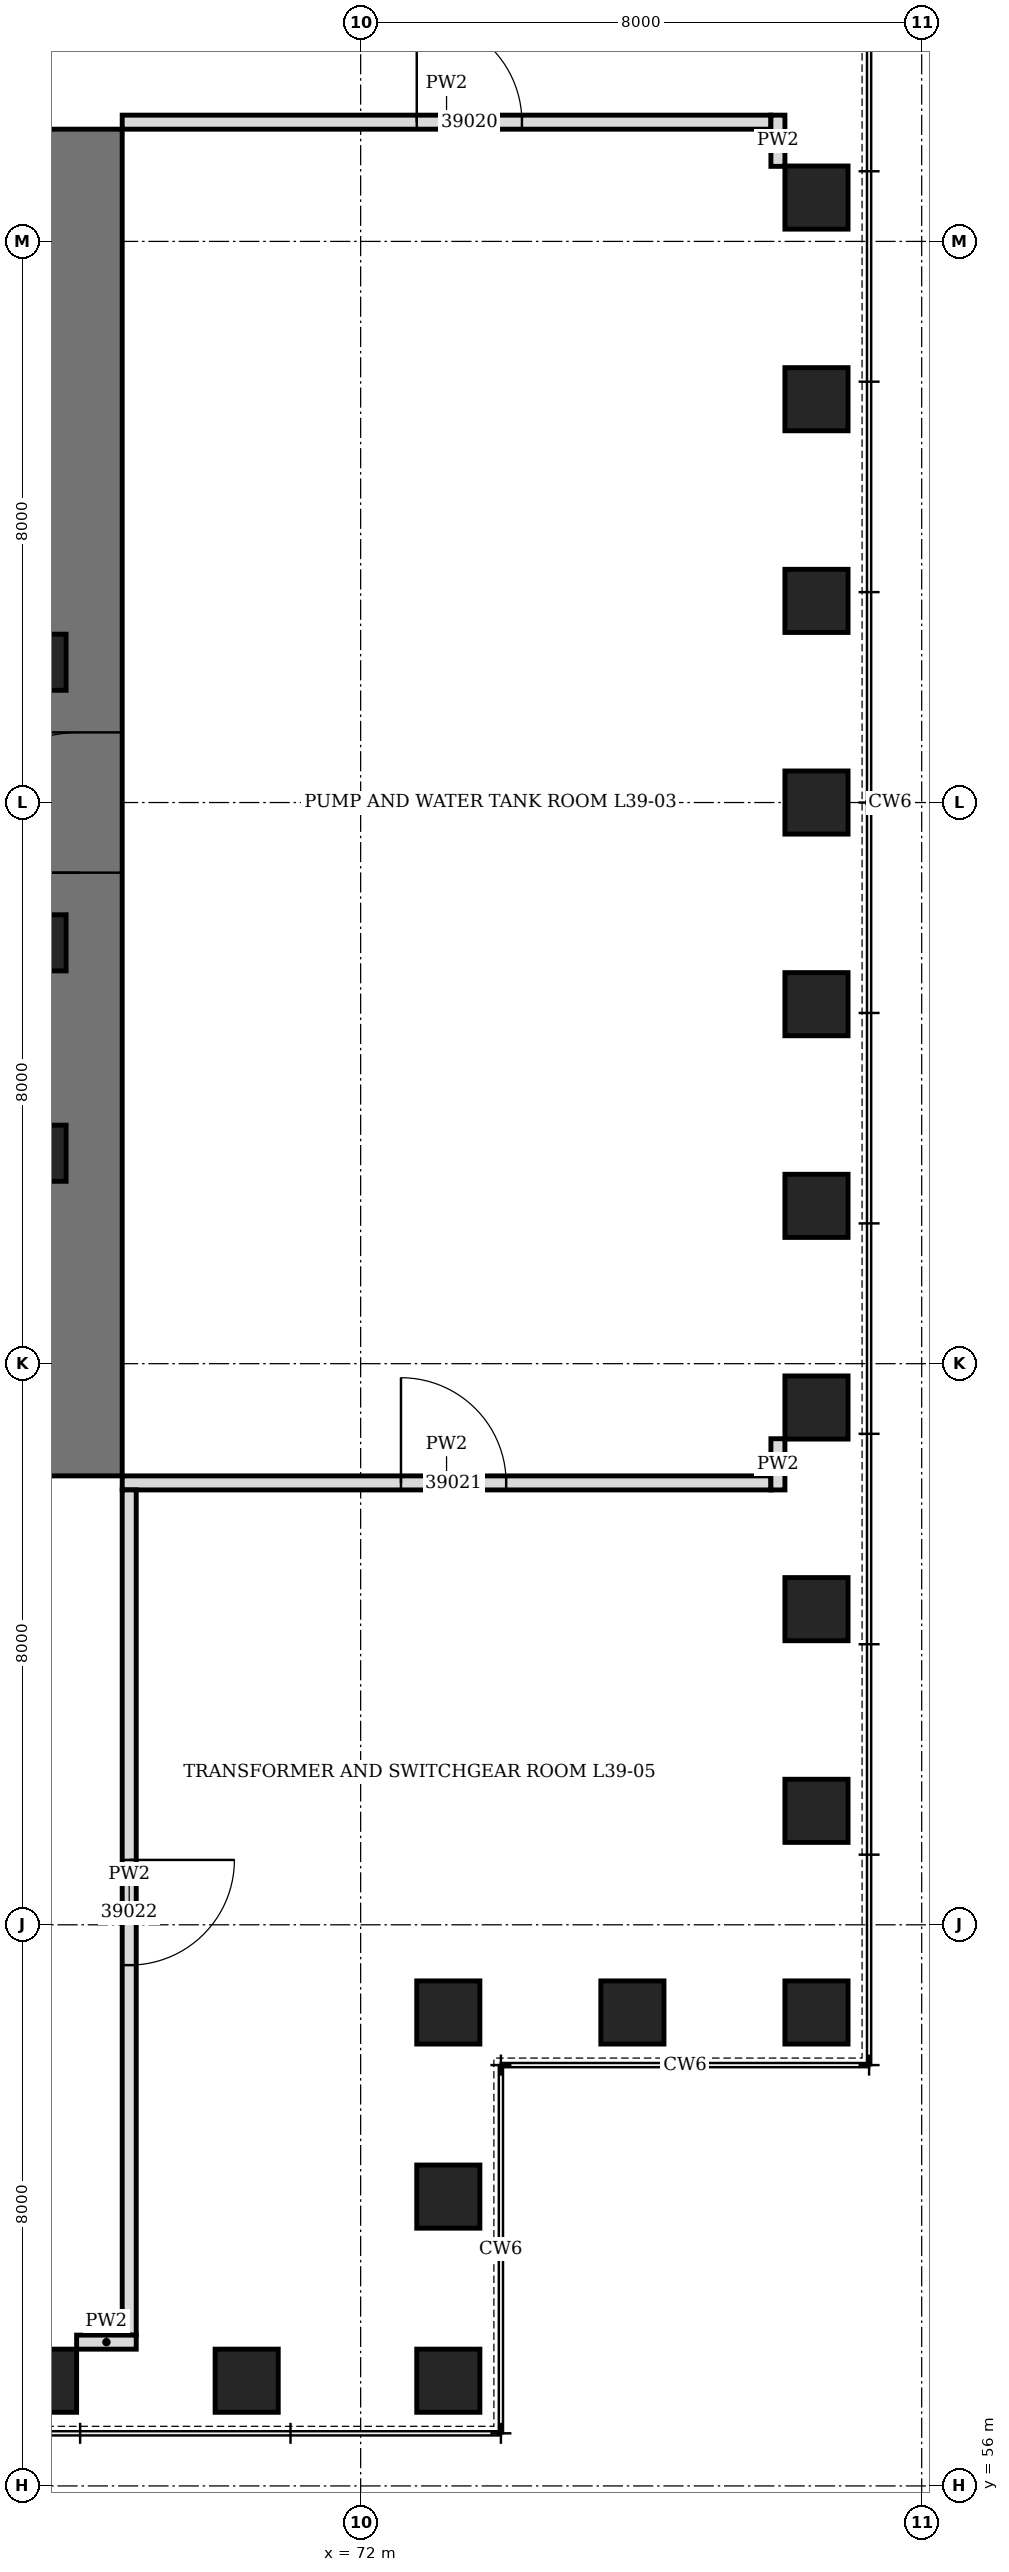
"""IFC4 building model, lengths in metres.
Left out: names, types, materials, properties, quantities, classifications, styles, units other than length and angle.
Written with IfcOpenShell. Run it as: python <this file> out.ifc"""

import sys

from ifc_helpers import new_model, si_unit, direction, frame, frame_2d, origin, origin_2d, place, context, subcontext, project, spatial, rectangle, hollow_rectangle, extrude, element, fill, save


model = new_model("IFC4")
c1 = context("Model", 3, precision=1e-05, world=origin(), true_north=direction((0.0, 1.0)))
c2 = subcontext(c1, "Body", "Model", "MODEL_VIEW")
j1 = project(units=[si_unit("LENGTHUNIT", "METRE"), si_unit("PLANEANGLEUNIT", "RADIAN")], contexts=[c1])
p1 = place(None, origin())
s1 = spatial("IfcSite", under=j1, at=p1, CompositionType="ELEMENT")
p2 = place(p1, origin())
s2 = spatial("IfcBuilding", under=s1, at=p2, CompositionType="ELEMENT")
p3 = place(p2, frame((0.0, 0.0, 175.3)))
s3 = spatial("IfcBuildingStorey", under=s2, at=p3, CompositionType="ELEMENT", Elevation=175.3)
for number, where, z_axis, x_axis in (
    (1, (67.5, 57.5, 0.0), (0.0, 0.0, 1.0), (1.0, 0.0, 0.0)),
    (2, (70.375, 57.5, 0.0), (0.0, 0.0, 1.0), (1.0, 0.0, 0.0)),
    (3, (73.25, 57.5, 0.0), (0.0, 0.0, 1.0), (0.0, 1.0, 0.0)),
    (4, (73.25, 60.125, 0.0), (0.0, 0.0, 1.0), (0.0, 1.0, 0.0)),
    (5, (73.25, 62.75, 0.0), (0.0, 0.0, 1.0), (1.0, 0.0, 0.0)),
    (6, (75.875, 62.75, 0.0), (0.0, 0.0, 1.0), (1.0, 0.0, 0.0)),
    (7, (78.5, 62.75, 0.0), (0.0, 0.0, 1.0), (0.0, 1.0, 0.0)),
    (8, (78.5, 65.625, 0.0), (0.0, 0.0, 1.0), (0.0, 1.0, 0.0)),
    (9, (78.5, 68.5, 0.0), (0.0, 0.0, 1.0), (0.0, 1.0, 0.0)),
    (10, (78.5, 71.375, 0.0), (0.0, 0.0, 1.0), (0.0, 1.0, 0.0)),
    (11, (78.5, 74.25, 0.0), (0.0, 0.0, 1.0), (0.0, 1.0, 0.0)),
    (12, (78.5, 77.125, 0.0), (0.0, 0.0, 1.0), (0.0, 1.0, 0.0)),
    (13, (78.5, 80.0, 0.0), (0.0, 0.0, 1.0), (0.0, 1.0, 0.0)),
    (14, (78.5, 82.875, 0.0), (0.0, 0.0, 1.0), (0.0, 1.0, 0.0)),
    (15, (78.5, 85.75, 0.0), (0.0, 0.0, 1.0), (0.0, 1.0, 0.0)),
    (16, (78.5, 88.625, 0.0), (0.0, 0.0, 1.0), (0.0, 1.0, 0.0)),
):
    element("IfcColumn", number, at=place(p3, frame(where, z_axis=z_axis, x_axis=x_axis)), inside=s3, PredefinedType="COLUMN", context=c2, shape_type="SweptSolid", body=[
        extrude(hollow_rectangle(XDim=0.9, YDim=0.9, WallThickness=0.12, at=origin_2d()), origin(), (0.0, 0.0, 1.0), 5.75),
    ])
p4 = place(p3, frame((68.0, 70.4, 0.0), z_axis=(0.0, 0.0, 1.0), x_axis=(0.0, 1.0, 0.0)))
e17 = element("IfcWall", 17, at=p4, inside=s3, PredefinedType="SHEAR", context=c2, shape_type="SweptSolid", body=[
    extrude(rectangle(XDim=19.2, YDim=1.2, at=frame_2d((9.6, 0.0))), origin(), (0.0, 0.0, 1.0), 6.0),
])
p5 = place(p4, frame((8.6, 0.0, 0.0)))
e18 = element("IfcOpeningElement", 18, at=p5, cuts=e17, PredefinedType="OPENING", context=c2, shape_type="SweptSolid", body=[
    extrude(rectangle(XDim=2.0, YDim=2.4, at=frame_2d((1.0, 1.2))), frame((0.0, 0.61, 0.0), z_axis=(0.0, -1.0, 0.0), x_axis=(1.0, 0.0, 0.0)), (0.0, 0.0, 1.0), 1.22),
])
for number, where, z_axis, x_axis in (
    (19, (67.4, 75.0, 0.0), (0.0, 0.0, 1.0), (1.0, 0.0, 0.0)),
    (20, (67.4, 78.0, 0.0), (0.0, 0.0, 1.0), (1.0, 0.0, 0.0)),
    (21, (67.4, 82.0, 0.0), (0.0, 0.0, 1.0), (1.0, 0.0, 0.0)),
):
    element("IfcColumn", number, at=place(p3, frame(where, z_axis=z_axis, x_axis=x_axis)), inside=s3, PredefinedType="COLUMN", context=c2, shape_type="SweptSolid", body=[
        extrude(hollow_rectangle(XDim=0.8, YDim=0.8, WallThickness=0.1, at=origin_2d()), origin(), (0.0, 0.0, 1.0), 6.0),
    ])
p6 = place(p3, frame((68.6, 89.7, 0.0), z_axis=(0.0, 0.0, 1.0), x_axis=(1.0, 0.0, 0.0)))
e22 = element("IfcWall", 22, at=p6, inside=s3, PredefinedType="PARTITIONING", context=c2, shape_type="SweptSolid", body=[
    extrude(rectangle(XDim=9.25, YDim=0.2, at=frame_2d((4.625, 0.0))), origin(), (0.0, 0.0, 1.0), 5.75),
])
p7 = place(p6, frame((4.2, 0.0, 0.0)))
e23 = element("IfcOpeningElement", 23, at=p7, cuts=e22, PredefinedType="OPENING", context=c2, shape_type="SweptSolid", body=[
    extrude(rectangle(XDim=1.5, YDim=2.4, at=frame_2d((0.75, 1.2))), frame((0.0, 0.11, 0.0), z_axis=(0.0, -1.0, 0.0), x_axis=(1.0, 0.0, 0.0)), (0.0, 0.0, 1.0), 0.22),
])
p8 = place(p3, frame((77.95, 89.8, 0.0), z_axis=(0.0, 0.0, 1.0), x_axis=(0.0, -1.0, 0.0)))
e24 = element("IfcWall", 24, at=p8, inside=s3, PredefinedType="PARTITIONING", context=c2, shape_type="SweptSolid", body=[
    extrude(rectangle(XDim=0.73, YDim=0.2, at=frame_2d((0.365, 0.0))), origin(), (0.0, 0.0, 1.0), 3.25),
])
p9 = place(p3, frame((68.6, 70.3, 0.0), z_axis=(0.0, 0.0, 1.0), x_axis=(1.0, 0.0, 0.0)))
e25 = element("IfcWall", 25, at=p9, inside=s3, PredefinedType="PARTITIONING", context=c2, shape_type="SweptSolid", body=[
    extrude(rectangle(XDim=9.25, YDim=0.2, at=frame_2d((4.625, 0.0))), origin(), (0.0, 0.0, 1.0), 5.75),
])
p10 = place(p9, frame((3.975, 0.0, 0.0)))
e26 = element("IfcOpeningElement", 26, at=p10, cuts=e25, PredefinedType="OPENING", context=c2, shape_type="SweptSolid", body=[
    extrude(rectangle(XDim=1.5, YDim=2.4, at=frame_2d((0.75, 1.2))), frame((0.0, 0.11, 0.0), z_axis=(0.0, -1.0, 0.0), x_axis=(1.0, 0.0, 0.0)), (0.0, 0.0, 1.0), 0.22),
])
p11 = place(p3, frame((77.95, 70.2, 0.0), z_axis=(0.0, 0.0, 1.0), x_axis=(0.0, 1.0, 0.0)))
e27 = element("IfcWall", 27, at=p11, inside=s3, PredefinedType="PARTITIONING", context=c2, shape_type="SweptSolid", body=[
    extrude(rectangle(XDim=0.73, YDim=0.2, at=frame_2d((0.365, 0.0))), origin(), (0.0, 0.0, 1.0), 3.25),
])
p12 = place(p3, frame((68.7, 70.2, 0.0), z_axis=(0.0, 0.0, 1.0), x_axis=(0.0, -1.0, 0.0)))
e28 = element("IfcWall", 28, at=p12, inside=s3, PredefinedType="PARTITIONING", context=c2, shape_type="SweptSolid", body=[
    extrude(rectangle(XDim=12.05, YDim=0.2, at=frame_2d((6.025, 0.0))), origin(), (0.0, 0.0, 1.0), 5.75),
])
p13 = place(p12, frame((5.275, 0.0, 0.0)))
e29 = element("IfcOpeningElement", 29, at=p13, cuts=e28, PredefinedType="OPENING", context=c2, shape_type="SweptSolid", body=[
    extrude(rectangle(XDim=1.5, YDim=2.4, at=frame_2d((0.75, 1.2))), frame((0.0, 0.11, 0.0), z_axis=(0.0, -1.0, 0.0), x_axis=(1.0, 0.0, 0.0)), (0.0, 0.0, 1.0), 0.22),
])
p14 = place(p3, frame((68.8, 58.05, 0.0), z_axis=(0.0, 0.0, 1.0), x_axis=(-1.0, 0.0, 0.0)))
e30 = element("IfcWall", 30, at=p14, inside=s3, PredefinedType="PARTITIONING", context=c2, shape_type="SweptSolid", body=[
    extrude(rectangle(XDim=0.85, YDim=0.2, at=frame_2d((0.425, 0.0))), origin(), (0.0, 0.0, 1.0), 3.25),
])
p15 = place(p5, origin())
e31 = element("IfcDoor", 31, at=p15, inside=s3, OperationType="DOUBLE_DOOR_SINGLE_SWING", PredefinedType="DOOR", context=c2, shape_type="SweptSolid", body=[
    extrude(rectangle(XDim=2.0, YDim=2.4, at=frame_2d((1.0, 1.2))), frame((0.0, 0.35, 0.0), z_axis=(0.0, -1.0, 0.0), x_axis=(1.0, 0.0, 0.0)), (0.0, 0.0, 1.0), 0.7),
])
fill(e18, e31)
p16 = place(p7, origin())
e32 = element("IfcDoor", 32, at=p16, inside=s3, OperationType="DOUBLE_DOOR_SINGLE_SWING", PredefinedType="DOOR", context=c2, shape_type="SweptSolid", body=[
    extrude(rectangle(XDim=1.5, YDim=2.4, at=frame_2d((0.75, 1.2))), frame((0.0, 0.1, 0.0), z_axis=(0.0, -1.0, 0.0), x_axis=(1.0, 0.0, 0.0)), (0.0, 0.0, 1.0), 0.199),
])
fill(e23, e32)
p17 = place(p10, origin())
e33 = element("IfcDoor", 33, at=p17, inside=s3, OperationType="DOUBLE_DOOR_SINGLE_SWING", PredefinedType="DOOR", context=c2, shape_type="SweptSolid", body=[
    extrude(rectangle(XDim=1.5, YDim=2.4, at=frame_2d((0.75, 1.2))), frame((0.0, 0.1, 0.0), z_axis=(0.0, -1.0, 0.0), x_axis=(1.0, 0.0, 0.0)), (0.0, 0.0, 1.0), 0.199),
])
fill(e26, e33)
p18 = place(p13, origin())
e34 = element("IfcDoor", 34, at=p18, inside=s3, OperationType="DOUBLE_DOOR_SINGLE_SWING", PredefinedType="DOOR", context=c2, shape_type="SweptSolid", body=[
    extrude(rectangle(XDim=1.5, YDim=2.4, at=frame_2d((0.75, 1.2))), frame((0.0, 0.1, 0.0), z_axis=(0.0, -1.0, 0.0), x_axis=(1.0, 0.0, 0.0)), (0.0, 0.0, 1.0), 0.199),
])
fill(e29, e34)
save(model, sys.argv[1])
